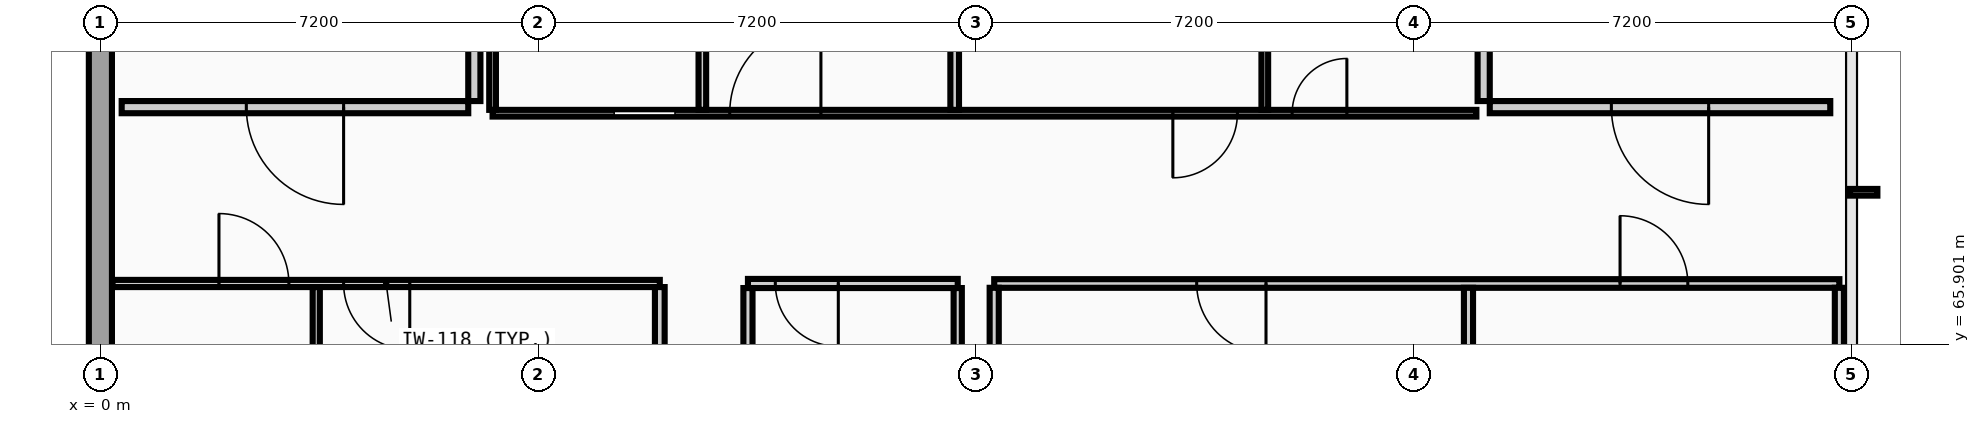
"""IFC4 building model, lengths in metres.
Left out: names, types, materials, properties, quantities, classifications, styles, units other than length and angle.
Written with IfcOpenShell. Run it as: python <this file> out.ifc"""

import sys

from ifc_helpers import new_model, si_unit, direction, frame, frame_2d, origin, place, context, subcontext, project, spatial, rectangle, extrude, element, fill, save


model = new_model("IFC4")
c1 = context("Model", 3, precision=1e-05, world=origin(), true_north=direction((0.0, 1.0)))
c2 = subcontext(c1, "Body", "Model", "MODEL_VIEW")
j1 = project(units=[si_unit("LENGTHUNIT", "METRE"), si_unit("PLANEANGLEUNIT", "RADIAN")], contexts=[c1])
p1 = place(None, origin())
s1 = spatial("IfcSite", under=j1, at=p1, CompositionType="ELEMENT")
p2 = place(p1, origin())
s2 = spatial("IfcBuilding", under=s1, at=p2, CompositionType="ELEMENT")
p3 = place(p2, frame((0.0, 0.0, 9.6)))
s3 = spatial("IfcBuildingStorey", under=s2, at=p3, CompositionType="ELEMENT", Elevation=9.6)
p4 = place(p3, frame((0.0, 72.0, 0.0), z_axis=(0.0, 0.0, 1.0), x_axis=(0.0, -1.0, 0.0)))
e1 = element("IfcWall", 1, at=p4, inside=s3, PredefinedType="STANDARD", context=c2, shape_type="SweptSolid", body=[
    extrude(rectangle(XDim=7.2, YDim=0.38, at=frame_2d((3.6, 0.0))), origin(), (0.0, 0.0, 1.0), 3.885),
])
p5 = place(p3, frame((0.35, 69.8, 0.0), z_axis=(0.0, 0.0, 1.0), x_axis=(1.0, 0.0, 0.0)))
e2 = element("IfcWall", 2, at=p5, inside=s3, PredefinedType="PARTITIONING", context=c2, shape_type="SweptSolid", body=[
    extrude(rectangle(XDim=5.7, YDim=0.2, at=frame_2d((2.85, 0.0))), origin(), (0.0, 0.0, 1.0), 4.2),
])
p6 = place(p5, frame((2.05, 0.0, 0.0)))
e3 = element("IfcOpeningElement", 3, at=p6, cuts=e2, PredefinedType="OPENING", context=c2, shape_type="SweptSolid", body=[
    extrude(rectangle(XDim=1.6, YDim=2.2, at=frame_2d((0.8, 1.1))), frame((0.0, 0.11, 0.0), z_axis=(0.0, -1.0, 0.0), x_axis=(1.0, 0.0, 0.0)), (0.0, 0.0, 1.0), 0.22),
])
p7 = place(p3, frame((6.15, 69.9, 0.0), z_axis=(0.0, 0.0, 1.0), x_axis=(0.0, 1.0, 0.0)))
e4 = element("IfcWall", 4, at=p7, inside=s3, PredefinedType="PARTITIONING", context=c2, shape_type="SweptSolid", body=[
    extrude(rectangle(XDim=3.2, YDim=0.2, at=frame_2d((1.6, 0.0))), origin(), (0.0, 0.0, 1.0), 4.2),
])
p8 = place(p3, frame((22.85, 69.8, 0.0), z_axis=(0.0, 0.0, 1.0), x_axis=(1.0, 0.0, 0.0)))
e5 = element("IfcWall", 5, at=p8, inside=s3, PredefinedType="PARTITIONING", context=c2, shape_type="SweptSolid", body=[
    extrude(rectangle(XDim=5.6, YDim=0.2, at=frame_2d((2.8, 0.0))), origin(), (0.0, 0.0, 1.0), 4.2),
])
p9 = place(p8, frame((2.0, 0.0, 0.0)))
e6 = element("IfcOpeningElement", 6, at=p9, cuts=e5, PredefinedType="OPENING", context=c2, shape_type="SweptSolid", body=[
    extrude(rectangle(XDim=1.6, YDim=2.2, at=frame_2d((0.8, 1.1))), frame((0.0, 0.11, 0.0), z_axis=(0.0, -1.0, 0.0), x_axis=(1.0, 0.0, 0.0)), (0.0, 0.0, 1.0), 0.22),
])
p10 = place(p3, frame((22.75, 69.9, 0.0), z_axis=(0.0, 0.0, 1.0), x_axis=(0.0, 1.0, 0.0)))
e7 = element("IfcWall", 7, at=p10, inside=s3, PredefinedType="PARTITIONING", context=c2, shape_type="SweptSolid", body=[
    extrude(rectangle(XDim=3.2, YDim=0.2, at=frame_2d((1.6, 0.0))), origin(), (0.0, 0.0, 1.0), 4.2),
])
p11 = place(p3, frame((0.2, 66.9, 0.0), z_axis=(0.0, 0.0, 1.0), x_axis=(1.0, 0.0, 0.0)))
e8 = element("IfcWall", 8, at=p11, inside=s3, PredefinedType="PARTITIONING", context=c2, shape_type="SweptSolid", body=[
    extrude(rectangle(XDim=9.0, YDim=0.118, at=frame_2d((4.5, 0.0))), origin(), (0.0, 0.0, 1.0), 4.2),
])
p12 = place(p11, frame((1.75, 0.0, 0.0)))
e9 = element("IfcOpeningElement", 9, at=p12, cuts=e8, PredefinedType="OPENING", context=c2, shape_type="SweptSolid", body=[
    extrude(rectangle(XDim=1.15, YDim=2.15, at=frame_2d((0.575, 1.075))), frame((0.0, 0.069, 0.0), z_axis=(0.0, -1.0, 0.0), x_axis=(1.0, 0.0, 0.0)), (0.0, 0.0, 1.0), 0.138),
])
p13 = place(p11, frame((3.8, 0.0, 0.0)))
e10 = element("IfcOpeningElement", 10, at=p13, cuts=e8, PredefinedType="OPENING", context=c2, shape_type="SweptSolid", body=[
    extrude(rectangle(XDim=1.088, YDim=2.152, at=frame_2d((0.544, 1.076))), frame((0.0, 0.069, 0.0), z_axis=(0.0, -1.0, 0.0), x_axis=(1.0, 0.0, 0.0)), (0.0, 0.0, 1.0), 0.138),
])
p14 = place(p3, frame((10.65, 66.9, 0.0), z_axis=(0.0, 0.0, 1.0), x_axis=(1.0, 0.0, 0.0)))
e11 = element("IfcWall", 11, at=p14, inside=s3, PredefinedType="PARTITIONING", context=c2, shape_type="SweptSolid", body=[
    extrude(rectangle(XDim=3.45, YDim=0.15, at=frame_2d((1.725, 0.0))), origin(), (0.0, 0.0, 1.0), 4.2),
])
p15 = place(p14, frame((0.45, 0.0, 0.0)))
e12 = element("IfcOpeningElement", 12, at=p15, cuts=e11, PredefinedType="OPENING", context=c2, shape_type="SweptSolid", body=[
    extrude(rectangle(XDim=1.036, YDim=2.152, at=frame_2d((0.518, 1.076))), frame((0.0, 0.085, 0.0), z_axis=(0.0, -1.0, 0.0), x_axis=(1.0, 0.0, 0.0)), (0.0, 0.0, 1.0), 0.17),
])
p16 = place(p3, frame((14.7, 66.9, 0.0), z_axis=(0.0, 0.0, 1.0), x_axis=(1.0, 0.0, 0.0)))
e13 = element("IfcWall", 13, at=p16, inside=s3, PredefinedType="PARTITIONING", context=c2, shape_type="SweptSolid", body=[
    extrude(rectangle(XDim=13.9, YDim=0.142, at=frame_2d((6.95, 0.0))), origin(), (0.0, 0.0, 1.0), 4.2),
])
p17 = place(p16, frame((10.293, 0.0, 0.0)))
e14 = element("IfcOpeningElement", 14, at=p17, cuts=e13, PredefinedType="OPENING", context=c2, shape_type="SweptSolid", body=[
    extrude(rectangle(XDim=1.114, YDim=2.152, at=frame_2d((0.557, 1.076))), frame((0.0, 0.081, 0.0), z_axis=(0.0, -1.0, 0.0), x_axis=(1.0, 0.0, 0.0)), (0.0, 0.0, 1.0), 0.162),
])
p18 = place(p16, frame((3.33, 0.0, 0.0)))
e15 = element("IfcOpeningElement", 15, at=p18, cuts=e13, PredefinedType="OPENING", context=c2, shape_type="SweptSolid", body=[
    extrude(rectangle(XDim=1.14, YDim=2.152, at=frame_2d((0.57, 1.076))), frame((0.0, 0.081, 0.0), z_axis=(0.0, -1.0, 0.0), x_axis=(1.0, 0.0, 0.0)), (0.0, 0.0, 1.0), 0.162),
])
p19 = place(p3, frame((6.45, 69.7, 0.0), z_axis=(0.0, 0.0, 1.0), x_axis=(1.0, 0.0, 0.0)))
e16 = element("IfcWall", 16, at=p19, inside=s3, PredefinedType="PARTITIONING", context=c2, shape_type="SweptSolid", body=[
    extrude(rectangle(XDim=16.18, YDim=0.11, at=frame_2d((8.09, 0.0))), origin(), (0.0, 0.0, 1.0), 4.2),
])
p20 = place(p19, frame((2.0, 0.0, 0.0)))
e17 = element("IfcOpeningElement", 17, at=p20, cuts=e16, PredefinedType="OPENING", context=c2, shape_type="SweptSolid", body=[
    extrude(rectangle(XDim=1.0, YDim=2.1, at=frame_2d((0.5, 1.05))), frame((0.0, 0.065, 0.0), z_axis=(0.0, -1.0, 0.0), x_axis=(1.0, 0.0, 0.0)), (0.0, 0.0, 1.0), 0.13),
])
p21 = place(p19, frame((13.15, 0.0, 0.0)))
e18 = element("IfcOpeningElement", 18, at=p21, cuts=e16, PredefinedType="OPENING", context=c2, shape_type="SweptSolid", body=[
    extrude(rectangle(XDim=0.9, YDim=2.1, at=frame_2d((0.45, 1.05))), frame((0.0, 0.065, 0.0), z_axis=(0.0, -1.0, 0.0), x_axis=(1.0, 0.0, 0.0)), (0.0, 0.0, 1.0), 0.13),
])
p22 = place(p19, frame((3.9, 0.0, 0.0)))
e19 = element("IfcOpeningElement", 19, at=p22, cuts=e16, PredefinedType="OPENING", context=c2, shape_type="SweptSolid", body=[
    extrude(rectangle(XDim=1.5, YDim=2.2, at=frame_2d((0.75, 1.1))), frame((0.0, 0.065, 0.0), z_axis=(0.0, -1.0, 0.0), x_axis=(1.0, 0.0, 0.0)), (0.0, 0.0, 1.0), 0.13),
])
p23 = place(p19, frame((11.188, 0.0, 0.0)))
e20 = element("IfcOpeningElement", 20, at=p23, cuts=e16, PredefinedType="OPENING", context=c2, shape_type="SweptSolid", body=[
    extrude(rectangle(XDim=1.062, YDim=2.152, at=frame_2d((0.531, 1.076))), frame((0.0, 0.065, 0.0), z_axis=(0.0, -1.0, 0.0), x_axis=(1.0, 0.0, 0.0)), (0.0, 0.0, 1.0), 0.13),
])
p24 = place(p3, frame((3.55, 51.32, 0.0), z_axis=(0.0, 0.0, 1.0), x_axis=(0.0, 1.0, 0.0)))
e21 = element("IfcWall", 21, at=p24, inside=s3, PredefinedType="PARTITIONING", context=c2, shape_type="SweptSolid", body=[
    extrude(rectangle(XDim=15.521, YDim=0.118, at=frame_2d((7.76, 0.0))), origin(), (0.0, 0.0, 1.0), 4.2),
])
p25 = place(p3, frame((6.45, 69.755, 0.0), z_axis=(0.0, 0.0, 1.0), x_axis=(0.0, 1.0, 0.0)))
e22 = element("IfcWall", 22, at=p25, inside=s3, PredefinedType="PARTITIONING", context=c2, shape_type="SweptSolid", body=[
    extrude(rectangle(XDim=3.17, YDim=0.11, at=frame_2d((1.585, 0.0))), origin(), (0.0, 0.0, 1.0), 4.2),
])
p26 = place(p3, frame((9.2, 60.96, 0.0), z_axis=(0.0, 0.0, 1.0), x_axis=(0.0, 1.0, 0.0)))
e23 = element("IfcWall", 23, at=p26, inside=s3, PredefinedType="PARTITIONING", context=c2, shape_type="SweptSolid", body=[
    extrude(rectangle(XDim=5.881, YDim=0.16, at=frame_2d((2.94, 0.0))), origin(), (0.0, 0.0, 1.0), 4.2),
])
p27 = place(p3, frame((9.9, 69.755, 0.0), z_axis=(0.0, 0.0, 1.0), x_axis=(0.0, 1.0, 0.0)))
e24 = element("IfcWall", 24, at=p27, inside=s3, PredefinedType="PARTITIONING", context=c2, shape_type="SweptSolid", body=[
    extrude(rectangle(XDim=12.045, YDim=0.125, at=frame_2d((6.022, 0.0))), origin(), (0.0, 0.0, 1.0), 4.2),
])
p28 = place(p3, frame((10.65, 60.96, 0.0), z_axis=(0.0, 0.0, 1.0), x_axis=(0.0, 1.0, 0.0)))
e25 = element("IfcWall", 25, at=p28, inside=s3, PredefinedType="PARTITIONING", context=c2, shape_type="SweptSolid", body=[
    extrude(rectangle(XDim=5.865, YDim=0.15, at=frame_2d((2.933, 0.0))), origin(), (0.0, 0.0, 1.0), 4.2),
])
p29 = place(p3, frame((14.05, 69.755, 0.0), z_axis=(0.0, 0.0, 1.0), x_axis=(0.0, 1.0, 0.0)))
e26 = element("IfcWall", 26, at=p29, inside=s3, PredefinedType="PARTITIONING", context=c2, shape_type="SweptSolid", body=[
    extrude(rectangle(XDim=1.865, YDim=0.142, at=frame_2d((0.933, 0.0))), origin(), (0.0, 0.0, 1.0), 4.2),
])
p30 = place(p3, frame((14.1, 65.18, 0.0), z_axis=(0.0, 0.0, 1.0), x_axis=(0.0, 1.0, 0.0)))
e27 = element("IfcWall", 27, at=p30, inside=s3, PredefinedType="PARTITIONING", context=c2, shape_type="SweptSolid", body=[
    extrude(rectangle(XDim=1.645, YDim=0.135, at=frame_2d((0.823, 0.0))), origin(), (0.0, 0.0, 1.0), 4.2),
])
p31 = place(p3, frame((14.7, 65.18, 0.0), z_axis=(0.0, 0.0, 1.0), x_axis=(0.0, 1.0, 0.0)))
e28 = element("IfcWall", 28, at=p31, inside=s3, PredefinedType="PARTITIONING", context=c2, shape_type="SweptSolid", body=[
    extrude(rectangle(XDim=1.649, YDim=0.15, at=frame_2d((0.825, 0.0))), origin(), (0.0, 0.0, 1.0), 3.895),
])
p32 = place(p3, frame((19.15, 69.755, 0.0), z_axis=(0.0, 0.0, 1.0), x_axis=(0.0, 1.0, 0.0)))
e29 = element("IfcWall", 29, at=p32, inside=s3, PredefinedType="PARTITIONING", context=c2, shape_type="SweptSolid", body=[
    extrude(rectangle(XDim=12.045, YDim=0.11, at=frame_2d((6.022, 0.0))), origin(), (0.0, 0.0, 1.0), 3.915),
])
p33 = place(p3, frame((22.5, 51.32, 0.0), z_axis=(0.0, 0.0, 1.0), x_axis=(0.0, 1.0, 0.0)))
e30 = element("IfcWall", 30, at=p33, inside=s3, PredefinedType="PARTITIONING", context=c2, shape_type="SweptSolid", body=[
    extrude(rectangle(XDim=15.509, YDim=0.15, at=frame_2d((7.754, 0.0))), origin(), (0.0, 0.0, 1.0), 4.2),
])
p34 = place(p3, frame((28.6, 65.18, 0.0), z_axis=(0.0, 0.0, 1.0), x_axis=(0.0, 1.0, 0.0)))
e31 = element("IfcWall", 31, at=p34, inside=s3, PredefinedType="PARTITIONING", context=c2, shape_type="SweptSolid", body=[
    extrude(rectangle(XDim=1.649, YDim=0.15, at=frame_2d((0.825, 0.0))), origin(), (0.0, 0.0, 1.0), 3.885),
])
p35 = place(p6, origin())
e32 = element("IfcDoor", 32, at=p35, inside=s3, OperationType="DOUBLE_DOOR_SINGLE_SWING", PredefinedType="DOOR", context=c2, shape_type="SweptSolid", body=[
    extrude(rectangle(XDim=1.6, YDim=2.2, at=frame_2d((0.8, 1.1))), frame((0.0, 0.025, 0.0), z_axis=(0.0, -1.0, 0.0), x_axis=(1.0, 0.0, 0.0)), (0.0, 0.0, 1.0), 0.05),
])
fill(e3, e32)
p36 = place(p9, origin())
e33 = element("IfcDoor", 33, at=p36, inside=s3, OperationType="DOUBLE_DOOR_SINGLE_SWING", PredefinedType="DOOR", context=c2, shape_type="SweptSolid", body=[
    extrude(rectangle(XDim=1.6, YDim=2.2, at=frame_2d((0.8, 1.1))), frame((0.0, 0.025, 0.0), z_axis=(0.0, -1.0, 0.0), x_axis=(1.0, 0.0, 0.0)), (0.0, 0.0, 1.0), 0.05),
])
fill(e6, e33)
p37 = place(p20, frame((1.0, 0.0, 0.0), z_axis=(0.0, 0.0, 1.0), x_axis=(-1.0, 0.0, 0.0)))
e34 = element("IfcDoor", 34, at=p37, inside=s3, OperationType="SLIDING_TO_LEFT", PredefinedType="DOOR", context=c2, shape_type="SweptSolid", body=[
    extrude(rectangle(XDim=1.0, YDim=2.1, at=frame_2d((0.5, 1.05))), frame((0.0, 0.025, 0.0), z_axis=(0.0, -1.0, 0.0), x_axis=(1.0, 0.0, 0.0)), (0.0, 0.0, 1.0), 0.05),
])
fill(e17, e34)
p38 = place(p21, frame((0.9, 0.0, 0.0), z_axis=(0.0, 0.0, 1.0), x_axis=(-1.0, 0.0, 0.0)))
e35 = element("IfcDoor", 35, at=p38, inside=s3, OperationType="SINGLE_SWING_RIGHT", PredefinedType="DOOR", context=c2, shape_type="SweptSolid", body=[
    extrude(rectangle(XDim=0.9, YDim=2.1, at=frame_2d((0.45, 1.05))), frame((0.0, 0.025, 0.0), z_axis=(0.0, -1.0, 0.0), x_axis=(1.0, 0.0, 0.0)), (0.0, 0.0, 1.0), 0.05),
])
fill(e18, e35)
p39 = place(p22, frame((1.5, 0.0, 0.0), z_axis=(0.0, 0.0, 1.0), x_axis=(-1.0, 0.0, 0.0)))
e36 = element("IfcDoor", 36, at=p39, inside=s3, OperationType="DOUBLE_DOOR_SINGLE_SWING", PredefinedType="DOOR", context=c2, shape_type="SweptSolid", body=[
    extrude(rectangle(XDim=1.5, YDim=2.2, at=frame_2d((0.75, 1.1))), frame((0.0, 0.025, 0.0), z_axis=(0.0, -1.0, 0.0), x_axis=(1.0, 0.0, 0.0)), (0.0, 0.0, 1.0), 0.05),
])
fill(e19, e36)
p40 = place(p12, origin())
e37 = element("IfcDoor", 37, at=p40, inside=s3, OperationType="SINGLE_SWING_LEFT", PredefinedType="DOOR", context=c2, shape_type="SweptSolid", body=[
    extrude(rectangle(XDim=1.15, YDim=2.15, at=frame_2d((0.575, 1.075))), frame((0.0, 0.025, 0.0), z_axis=(0.0, -1.0, 0.0), x_axis=(1.0, 0.0, 0.0)), (0.0, 0.0, 1.0), 0.05),
])
fill(e9, e37)
p41 = place(p15, origin())
e38 = element("IfcDoor", 38, at=p41, inside=s3, OperationType="SINGLE_SWING_RIGHT", PredefinedType="DOOR", context=c2, shape_type="SweptSolid", body=[
    extrude(rectangle(XDim=1.036, YDim=2.152, at=frame_2d((0.518, 1.076))), frame((0.0, 0.025, 0.0), z_axis=(0.0, -1.0, 0.0), x_axis=(1.0, 0.0, 0.0)), (0.0, 0.0, 1.0), 0.05),
])
fill(e12, e38)
p42 = place(p23, frame((1.062, 0.0, 0.0), z_axis=(0.0, 0.0, 1.0), x_axis=(-1.0, 0.0, 0.0)))
e39 = element("IfcDoor", 39, at=p42, inside=s3, OperationType="SINGLE_SWING_LEFT", PredefinedType="DOOR", context=c2, shape_type="SweptSolid", body=[
    extrude(rectangle(XDim=1.062, YDim=2.152, at=frame_2d((0.531, 1.076))), frame((0.0, 0.025, 0.0), z_axis=(0.0, -1.0, 0.0), x_axis=(1.0, 0.0, 0.0)), (0.0, 0.0, 1.0), 0.05),
])
fill(e20, e39)
p43 = place(p13, origin())
e40 = element("IfcDoor", 40, at=p43, inside=s3, OperationType="SINGLE_SWING_RIGHT", PredefinedType="DOOR", context=c2, shape_type="SweptSolid", body=[
    extrude(rectangle(XDim=1.088, YDim=2.152, at=frame_2d((0.544, 1.076))), frame((0.0, 0.025, 0.0), z_axis=(0.0, -1.0, 0.0), x_axis=(1.0, 0.0, 0.0)), (0.0, 0.0, 1.0), 0.05),
])
fill(e10, e40)
p44 = place(p17, origin())
e41 = element("IfcDoor", 41, at=p44, inside=s3, OperationType="SINGLE_SWING_LEFT", PredefinedType="DOOR", context=c2, shape_type="SweptSolid", body=[
    extrude(rectangle(XDim=1.114, YDim=2.152, at=frame_2d((0.557, 1.076))), frame((0.0, 0.025, 0.0), z_axis=(0.0, -1.0, 0.0), x_axis=(1.0, 0.0, 0.0)), (0.0, 0.0, 1.0), 0.05),
])
fill(e14, e41)
p45 = place(p18, origin())
e42 = element("IfcDoor", 42, at=p45, inside=s3, OperationType="SINGLE_SWING_RIGHT", PredefinedType="DOOR", context=c2, shape_type="SweptSolid", body=[
    extrude(rectangle(XDim=1.14, YDim=2.152, at=frame_2d((0.57, 1.076))), frame((0.0, 0.025, 0.0), z_axis=(0.0, -1.0, 0.0), x_axis=(1.0, 0.0, 0.0)), (0.0, 0.0, 1.0), 0.05),
])
fill(e15, e42)
save(model, sys.argv[1])
